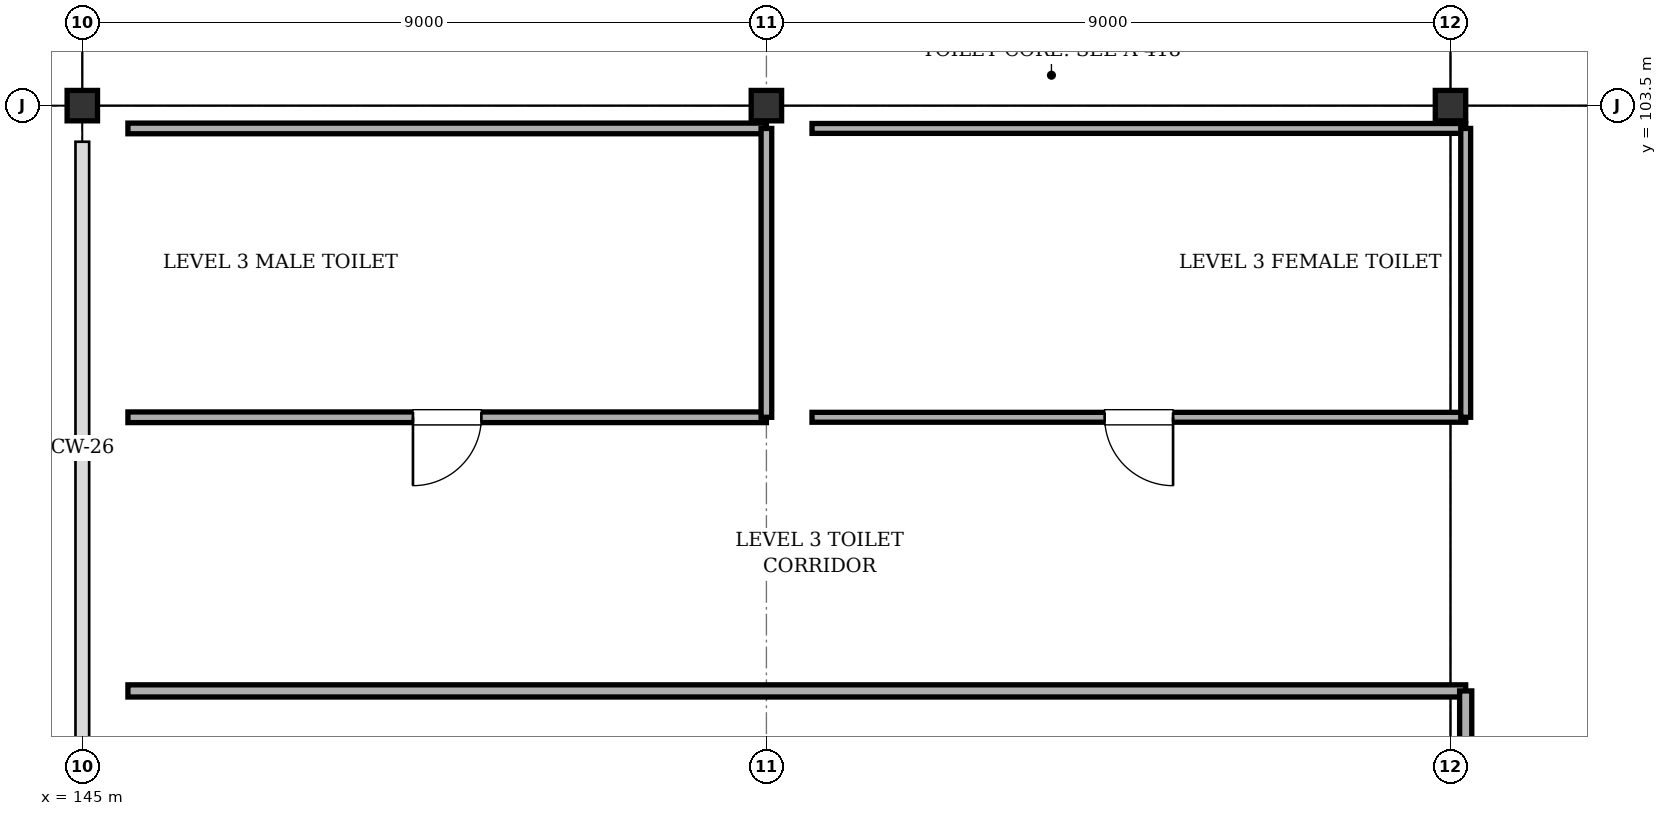
"""IFC4 building model, lengths in metres.
Left out: names, types, materials, properties, quantities, classifications, styles, units other than length and angle.
Written with IfcOpenShell. Run it as: python <this file> out.ifc"""

import sys

from ifc_helpers import new_model, si_unit, direction, frame, frame_2d, origin, origin_2d, place, context, subcontext, project, spatial, rectangle, i_section, extrude, element, fill, save


model = new_model("IFC4")
c1 = context("Model", 3, precision=1e-05, world=origin(), true_north=direction((0.0, 1.0)))
c2 = subcontext(c1, "Body", "Model", "MODEL_VIEW")
j1 = project(units=[si_unit("LENGTHUNIT", "METRE"), si_unit("PLANEANGLEUNIT", "RADIAN")], contexts=[c1])
p1 = place(None, origin())
s1 = spatial("IfcSite", under=j1, at=p1, CompositionType="ELEMENT")
p2 = place(p1, origin())
s2 = spatial("IfcBuilding", under=s1, at=p2, CompositionType="ELEMENT")
p3 = place(p2, frame((0.0, 0.0, 14.4)))
s3 = spatial("IfcBuildingStorey", under=s2, at=p3, CompositionType="ELEMENT", Elevation=14.4)
for number, where, z_axis, x_axis in (
    (1, (145.0, 103.5, 0.0), (0.0, 0.0, 1.0), (1.0, 0.0, 0.0)),
    (2, (154.0, 103.5, 0.0), (0.0, 0.0, 1.0), (1.0, 0.0, 0.0)),
    (3, (163.0, 103.5, 0.0), (0.0, 0.0, 1.0), (1.0, 0.0, 0.0)),
):
    element("IfcColumn", number, at=place(p3, frame(where, z_axis=z_axis, x_axis=x_axis)), inside=s3, PredefinedType="COLUMN", context=c2, shape_type="SweptSolid", body=[
        extrude(i_section(OverallWidth=0.4, OverallDepth=0.4, WebThickness=0.013, FlangeThickness=0.021, FilletRadius=0.022, at=origin_2d()), origin(), (0.0, 0.0, 1.0), 3.2),
    ])
p4 = place(p3, frame((145.6, 95.8, 0.0), z_axis=(0.0, 0.0, 1.0), x_axis=(1.0, 0.0, 0.0)))
e4 = element("IfcWall", 4, at=p4, inside=s3, PredefinedType="PARTITIONING", context=c2, shape_type="SweptSolid", body=[
    extrude(rectangle(XDim=17.6, YDim=0.16, at=frame_2d((8.8, 0.0))), origin(), (0.0, 0.0, 1.0), 2.555),
])
p5 = place(p3, frame((163.2, 95.8, 0.0), z_axis=(0.0, 0.0, 1.0), x_axis=(0.0, -1.0, 0.0)))
e5 = element("IfcWall", 5, at=p5, inside=s3, PredefinedType="PARTITIONING", context=c2, shape_type="SweptSolid", body=[
    extrude(rectangle(XDim=13.0, YDim=0.16, at=frame_2d((6.5, 0.0))), origin(), (0.0, 0.0, 1.0), 2.535),
])
p6 = place(p5, frame((5.825, 0.0, 0.0)))
e6 = element("IfcOpeningElement", 6, at=p6, cuts=e5, PredefinedType="OPENING", context=c2, shape_type="SweptSolid", body=[
    extrude(rectangle(XDim=1.35, YDim=2.1, at=frame_2d((0.675, 1.05))), frame((0.0, 0.09, 0.0), z_axis=(0.0, -1.0, 0.0), x_axis=(1.0, 0.0, 0.0)), (0.0, 0.0, 1.0), 0.18),
])
p7 = place(p5, frame((8.28, 0.0, 0.0)))
e7 = element("IfcOpeningElement", 7, at=p7, cuts=e5, PredefinedType="OPENING", context=c2, shape_type="SweptSolid", body=[
    extrude(rectangle(XDim=1.35, YDim=2.1, at=frame_2d((0.675, 1.05))), frame((0.0, 0.09, 0.0), z_axis=(0.0, -1.0, 0.0), x_axis=(1.0, 0.0, 0.0)), (0.0, 0.0, 1.0), 0.18),
])
p8 = place(p3, frame((154.0, 99.4, 0.0), z_axis=(0.0, 0.0, 1.0), x_axis=(-1.0, 0.0, 0.0)))
e8 = element("IfcWall", 8, at=p8, inside=s3, PredefinedType="PARTITIONING", context=c2, shape_type="SweptSolid", body=[
    extrude(rectangle(XDim=8.4, YDim=0.14, at=frame_2d((4.2, 0.0))), origin(), (0.0, 0.0, 1.0), 2.555),
])
p9 = place(p8, frame((3.75, 0.0, 0.0)))
e9 = element("IfcOpeningElement", 9, at=p9, cuts=e8, PredefinedType="OPENING", context=c2, shape_type="SweptSolid", body=[
    extrude(rectangle(XDim=0.9, YDim=2.1, at=frame_2d((0.45, 1.05))), frame((0.0, 0.08, 0.0), z_axis=(0.0, -1.0, 0.0), x_axis=(1.0, 0.0, 0.0)), (0.0, 0.0, 1.0), 0.16),
])
p10 = place(p3, frame((145.6, 103.2, 0.0), z_axis=(0.0, 0.0, 1.0), x_axis=(1.0, 0.0, 0.0)))
e10 = element("IfcWall", 10, at=p10, inside=s3, PredefinedType="PARTITIONING", context=c2, shape_type="SweptSolid", body=[
    extrude(rectangle(XDim=8.4, YDim=0.14, at=frame_2d((4.2, 0.0))), origin(), (0.0, 0.0, 1.0), 2.375),
])
p11 = place(p3, frame((154.0, 103.2, 0.0), z_axis=(0.0, 0.0, 1.0), x_axis=(0.0, -1.0, 0.0)))
e11 = element("IfcWall", 11, at=p11, inside=s3, PredefinedType="PARTITIONING", context=c2, shape_type="SweptSolid", body=[
    extrude(rectangle(XDim=3.8, YDim=0.14, at=frame_2d((1.9, 0.0))), origin(), (0.0, 0.0, 1.0), 2.505),
])
p12 = place(p3, frame((163.2, 99.4, 0.0), z_axis=(0.0, 0.0, 1.0), x_axis=(-1.0, 0.0, 0.0)))
e12 = element("IfcWall", 12, at=p12, inside=s3, PredefinedType="PARTITIONING", context=c2, shape_type="SweptSolid", body=[
    extrude(rectangle(XDim=8.6, YDim=0.13, at=frame_2d((4.3, 0.0))), origin(), (0.0, 0.0, 1.0), 2.555),
])
p13 = place(p12, frame((3.85, 0.0, 0.0)))
e13 = element("IfcOpeningElement", 13, at=p13, cuts=e12, PredefinedType="OPENING", context=c2, shape_type="SweptSolid", body=[
    extrude(rectangle(XDim=0.9, YDim=2.1, at=frame_2d((0.45, 1.05))), frame((0.0, 0.075, 0.0), z_axis=(0.0, -1.0, 0.0), x_axis=(1.0, 0.0, 0.0)), (0.0, 0.0, 1.0), 0.15),
])
p14 = place(p3, frame((154.6, 103.2, 0.0), z_axis=(0.0, 0.0, 1.0), x_axis=(1.0, 0.0, 0.0)))
e14 = element("IfcWall", 14, at=p14, inside=s3, PredefinedType="PARTITIONING", context=c2, shape_type="SweptSolid", body=[
    extrude(rectangle(XDim=8.6, YDim=0.13, at=frame_2d((4.3, 0.0))), origin(), (0.0, 0.0, 1.0), 2.375),
])
p15 = place(p3, frame((163.2, 103.2, 0.0), z_axis=(0.0, 0.0, 1.0), x_axis=(0.0, -1.0, 0.0)))
e15 = element("IfcWall", 15, at=p15, inside=s3, PredefinedType="PARTITIONING", context=c2, shape_type="SweptSolid", body=[
    extrude(rectangle(XDim=3.8, YDim=0.13, at=frame_2d((1.9, 0.0))), origin(), (0.0, 0.0, 1.0), 2.375),
])
p16 = place(p9, origin())
e16 = element("IfcDoor", 16, at=p16, inside=s3, OperationType="SINGLE_SWING_RIGHT", PredefinedType="DOOR", context=c2, shape_type="SweptSolid", body=[
    extrude(rectangle(XDim=0.9, YDim=2.1, at=frame_2d((0.45, 1.05))), frame((0.0, 0.025, 0.0), z_axis=(0.0, -1.0, 0.0), x_axis=(1.0, 0.0, 0.0)), (0.0, 0.0, 1.0), 0.05),
])
fill(e9, e16)
p17 = place(p13, origin())
e17 = element("IfcDoor", 17, at=p17, inside=s3, OperationType="SINGLE_SWING_LEFT", PredefinedType="DOOR", context=c2, shape_type="SweptSolid", body=[
    extrude(rectangle(XDim=0.9, YDim=2.1, at=frame_2d((0.45, 1.05))), frame((0.0, 0.025, 0.0), z_axis=(0.0, -1.0, 0.0), x_axis=(1.0, 0.0, 0.0)), (0.0, 0.0, 1.0), 0.05),
])
fill(e13, e17)
save(model, sys.argv[1])
